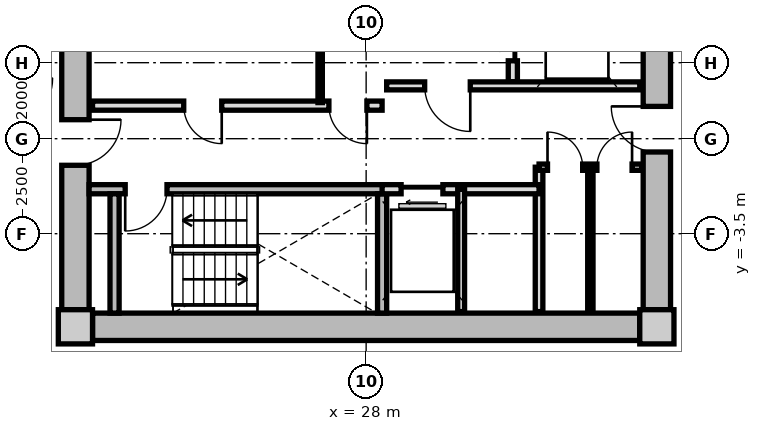
"""IFC4 building model, lengths in metres.
Left out: names, types, materials, properties, quantities, classifications, styles, units other than length and angle.
Written with IfcOpenShell. Run it as: python <this file> out.ifc"""

import sys

from ifc_helpers import new_model, si_unit, direction, frame, frame_2d, origin, origin_2d, place, context, subcontext, project, spatial, rectangle, extrude, source, transform, mapped, element, fill, save


model = new_model("IFC4")
c1 = context("Model", 3, precision=1e-05, world=origin(), true_north=direction((0.0, 1.0)))
c2 = subcontext(c1, "Body", "Model", "MODEL_VIEW")
j1 = project(units=[si_unit("LENGTHUNIT", "METRE"), si_unit("PLANEANGLEUNIT", "RADIAN")], contexts=[c1])
p1 = place(None, origin())
s1 = spatial("IfcSite", under=j1, at=p1, CompositionType="ELEMENT")
p2 = place(p1, origin())
s2 = spatial("IfcBuilding", under=s1, at=p2, CompositionType="ELEMENT")
p3 = place(p2, frame((0.0, 0.0, 87.1)))
s3 = spatial("IfcBuildingStorey", under=s2, at=p3, CompositionType="ELEMENT", Elevation=87.1)
m1 = source(origin(), c2, "Body", "SweptSolid", [
    extrude(rectangle(XDim=0.9, YDim=0.9, at=origin_2d()), origin(), (0.0, 0.0, 1.0), 3.05),
])
for number, where, z_axis, x_axis in (
    (1, (20.35, -5.95, 0.0), (0.0, 0.0, 1.0), (1.0, 0.0, 0.0)),
    (2, (35.65, -5.95, 0.0), (0.0, 0.0, 1.0), (1.0, 0.0, 0.0)),
):
    element("IfcColumn", number, at=place(p3, frame(where, z_axis=z_axis, x_axis=x_axis)), inside=s3, PredefinedType="COLUMN", context=c2, shape_type="MappedRepresentation", body=[
        mapped(m1, transform((0.0, 0.0, 0.0), x_axis=(1.0, 0.0, 0.0), y_axis=(0.0, 1.0, 0.0), z_axis=(0.0, 0.0, 1.0), scale=1.0)),
    ])
m2 = source(origin(), c2, "Body", "SweptSolid", [
    extrude(rectangle(XDim=14.4, YDim=0.72, at=frame_2d((7.2, 0.0))), origin(), (0.0, 0.0, 1.0), 2.79),
])
p4 = place(p3, frame((35.2, -5.95, 0.0), z_axis=(0.0, 0.0, 1.0), x_axis=(-1.0, 0.0, 0.0)))
e3 = element("IfcWall", 3, at=p4, inside=s3, PredefinedType="SHEAR", context=c2, shape_type="MappedRepresentation", body=[
    mapped(m2, transform((0.0, 0.0, 0.0), x_axis=(1.0, 0.0, 0.0), y_axis=(0.0, 1.0, 0.0), z_axis=(0.0, 0.0, 1.0), scale=1.0)),
])
m3 = source(origin(), c2, "Body", "SweptSolid", [
    extrude(rectangle(XDim=11.0, YDim=0.72, at=frame_2d((5.5, 0.0))), origin(), (0.0, 0.0, 1.0), 2.79),
])
p5 = place(p3, frame((20.35, -5.5, 0.0), z_axis=(0.0, 0.0, 1.0), x_axis=(0.0, 1.0, 0.0)))
e4 = element("IfcWall", 4, at=p5, inside=s3, PredefinedType="SHEAR", context=c2, shape_type="MappedRepresentation", body=[
    mapped(m3, transform((0.0, 0.0, 0.0), x_axis=(1.0, 0.0, 0.0), y_axis=(0.0, 1.0, 0.0), z_axis=(0.0, 0.0, 1.0), scale=1.0)),
])
p6 = place(p5, frame((3.8, 0.0, 0.0)))
e5 = element("IfcOpeningElement", 5, at=p6, cuts=e4, PredefinedType="OPENING", context=c2, shape_type="SweptSolid", body=[
    extrude(rectangle(XDim=1.2, YDim=2.15, at=frame_2d((0.6, 1.075))), frame((0.0, 0.37, 0.0), z_axis=(0.0, -1.0, 0.0), x_axis=(1.0, 0.0, 0.0)), (0.0, 0.0, 1.0), 0.74),
])
p7 = place(p3, frame((35.65, 5.5, 0.0), z_axis=(0.0, 0.0, 1.0), x_axis=(0.0, -1.0, 0.0)))
e6 = element("IfcWall", 6, at=p7, inside=s3, PredefinedType="SHEAR", context=c2, shape_type="MappedRepresentation", body=[
    mapped(m3, transform((0.0, 0.0, 0.0), x_axis=(1.0, 0.0, 0.0), y_axis=(0.0, 1.0, 0.0), z_axis=(0.0, 0.0, 1.0), scale=1.0)),
])
p8 = place(p7, frame((5.65, 0.0, 0.0)))
e7 = element("IfcOpeningElement", 7, at=p8, cuts=e6, PredefinedType="OPENING", context=c2, shape_type="SweptSolid", body=[
    extrude(rectangle(XDim=1.2, YDim=2.15, at=frame_2d((0.6, 1.075))), frame((0.0, 0.37, 0.0), z_axis=(0.0, -1.0, 0.0), x_axis=(1.0, 0.0, 0.0)), (0.0, 0.0, 1.0), 0.74),
])
m4 = source(origin(), c2, "Body", "SweptSolid", [
    extrude(rectangle(XDim=7.83, YDim=0.24, at=frame_2d((3.915, 0.0))), origin(), (0.0, 0.0, 1.0), 2.79),
])
p9 = place(p3, frame((20.71, -2.33, 0.0), z_axis=(0.0, 0.0, 1.0), x_axis=(1.0, 0.0, 0.0)))
e8 = element("IfcWall", 8, at=p9, inside=s3, PredefinedType="PARTITIONING", context=c2, shape_type="MappedRepresentation", body=[
    mapped(m4, transform((0.0, 0.0, 0.0), x_axis=(1.0, 0.0, 0.0), y_axis=(0.0, 1.0, 0.0), z_axis=(0.0, 0.0, 1.0), scale=1.0)),
])
p10 = place(p9, frame((0.95, 0.0, 0.0)))
e9 = element("IfcOpeningElement", 9, at=p10, cuts=e8, PredefinedType="OPENING", context=c2, shape_type="SweptSolid", body=[
    extrude(rectangle(XDim=1.1, YDim=2.15, at=frame_2d((0.55, 1.075))), frame((0.0, 0.13, 0.0), z_axis=(0.0, -1.0, 0.0), x_axis=(1.0, 0.0, 0.0)), (0.0, 0.0, 1.0), 0.26),
])
m5 = source(origin(), c2, "Body", "SweptSolid", [
    extrude(rectangle(XDim=3.14, YDim=0.24, at=frame_2d((1.57, 0.0))), origin(), (0.0, 0.0, 1.0), 2.79),
])
for number, where, z_axis, x_axis in (
    (10, (21.38, -5.59, 0.0), (0.0, 0.0, 1.0), (0.0, 1.0, 0.0)),
    (11, (28.42, -5.59, 0.0), (0.0, 0.0, 1.0), (0.0, 1.0, 0.0)),
):
    element("IfcWall", number, at=place(p3, frame(where, z_axis=z_axis, x_axis=x_axis)), inside=s3, PredefinedType="PARTITIONING", context=c2, shape_type="MappedRepresentation", body=[
        mapped(m5, transform((0.0, 0.0, 0.0), x_axis=(1.0, 0.0, 0.0), y_axis=(0.0, 1.0, 0.0), z_axis=(0.0, 0.0, 1.0), scale=1.0)),
    ])
m6 = source(origin(), c2, "Body", "SweptSolid", [
    extrude(rectangle(XDim=5.0, YDim=0.24, at=frame_2d((2.5, 0.0))), origin(), (0.0, 0.0, 1.0), 2.775),
])
p11 = place(p3, frame((31.86, 0.5, 0.0), z_axis=(0.0, 0.0, 1.0), x_axis=(0.0, 1.0, 0.0)))
e12 = element("IfcWall", 12, at=p11, inside=s3, PredefinedType="PARTITIONING", context=c2, shape_type="MappedRepresentation", body=[
    mapped(m6, transform((0.0, 0.0, 0.0), x_axis=(1.0, 0.0, 0.0), y_axis=(0.0, 1.0, 0.0), z_axis=(0.0, 0.0, 1.0), scale=1.0)),
])
p12 = place(p11, frame((3.05, 0.0, 0.0)))
e13 = element("IfcOpeningElement", 13, at=p12, cuts=e12, PredefinedType="OPENING", context=c2, shape_type="SweptSolid", body=[
    extrude(rectangle(XDim=1.3, YDim=2.2, at=frame_2d((0.65, 1.1))), frame((0.0, 0.13, 0.0), z_axis=(0.0, -1.0, 0.0), x_axis=(1.0, 0.0, 0.0)), (0.0, 0.0, 1.0), 0.26),
])
p13 = place(p11, frame((0.55, 0.0, 0.0)))
e14 = element("IfcOpeningElement", 14, at=p13, cuts=e12, PredefinedType="OPENING", context=c2, shape_type="SweptSolid", body=[
    extrude(rectangle(XDim=1.3, YDim=2.2, at=frame_2d((0.65, 1.1))), frame((0.0, 0.13, 0.0), z_axis=(0.0, -1.0, 0.0), x_axis=(1.0, 0.0, 0.0)), (0.0, 0.0, 1.0), 0.26),
])
m7 = source(origin(), c2, "Body", "SweptSolid", [
    extrude(rectangle(XDim=6.66, YDim=0.21, at=frame_2d((3.33, 0.0))), origin(), (0.0, 0.0, 1.0), 2.775),
])
p14 = place(p3, frame((28.54, 0.39, 0.0), z_axis=(0.0, 0.0, 1.0), x_axis=(1.0, 0.0, 0.0)))
e15 = element("IfcWall", 15, at=p14, inside=s3, PredefinedType="PARTITIONING", context=c2, shape_type="MappedRepresentation", body=[
    mapped(m7, transform((0.0, 0.0, 0.0), x_axis=(1.0, 0.0, 0.0), y_axis=(0.0, 1.0, 0.0), z_axis=(0.0, 0.0, 1.0), scale=1.0)),
])
p15 = place(p14, frame((1.0, 0.0, 0.0)))
e16 = element("IfcOpeningElement", 16, at=p15, cuts=e15, PredefinedType="OPENING", context=c2, shape_type="SweptSolid", body=[
    extrude(rectangle(XDim=1.2, YDim=2.15, at=frame_2d((0.6, 1.075))), frame((0.0, 0.115, 0.0), z_axis=(0.0, -1.0, 0.0), x_axis=(1.0, 0.0, 0.0)), (0.0, 0.0, 1.0), 0.23),
])
m8 = source(origin(), c2, "Body", "SweptSolid", [
    extrude(rectangle(XDim=7.62, YDim=0.24, at=frame_2d((3.81, 0.0))), origin(), (0.0, 0.0, 1.0), 2.775),
])
p16 = place(p3, frame((20.8, -0.13, 0.0), z_axis=(0.0, 0.0, 1.0), x_axis=(1.0, 0.0, 0.0)))
e17 = element("IfcWall", 17, at=p16, inside=s3, PredefinedType="PARTITIONING", context=c2, shape_type="MappedRepresentation", body=[
    mapped(m8, transform((0.0, 0.0, 0.0), x_axis=(1.0, 0.0, 0.0), y_axis=(0.0, 1.0, 0.0), z_axis=(0.0, 0.0, 1.0), scale=1.0)),
])
p17 = place(p16, frame((6.22, 0.0, 0.0)))
e18 = element("IfcOpeningElement", 18, at=p17, cuts=e17, PredefinedType="OPENING", context=c2, shape_type="SweptSolid", body=[
    extrude(rectangle(XDim=1.0, YDim=2.1, at=frame_2d((0.5, 1.05))), frame((0.0, 0.13, 0.0), z_axis=(0.0, -1.0, 0.0), x_axis=(1.0, 0.0, 0.0)), (0.0, 0.0, 1.0), 0.26),
])
p18 = place(p16, frame((2.4, 0.0, 0.0)))
e19 = element("IfcOpeningElement", 19, at=p18, cuts=e17, PredefinedType="OPENING", context=c2, shape_type="SweptSolid", body=[
    extrude(rectangle(XDim=1.0, YDim=2.1, at=frame_2d((0.5, 1.05))), frame((0.0, 0.13, 0.0), z_axis=(0.0, -1.0, 0.0), x_axis=(1.0, 0.0, 0.0)), (0.0, 0.0, 1.0), 0.26),
])
m9 = source(origin(), c2, "Body", "SweptSolid", [
    extrude(rectangle(XDim=2.33, YDim=0.115, at=frame_2d((1.165, 0.0))), origin(), (0.0, 0.0, 1.0), 2.775),
])
p19 = place(p3, frame((26.79, -0.05, 0.0), z_axis=(0.0, 0.0, 1.0), x_axis=(0.0, 1.0, 0.0)))
e20 = element("IfcWall", 20, at=p19, inside=s3, PredefinedType="PARTITIONING", context=c2, shape_type="MappedRepresentation", body=[
    mapped(m9, transform((0.0, 0.0, 0.0), x_axis=(1.0, 0.0, 0.0), y_axis=(0.0, 1.0, 0.0), z_axis=(0.0, 0.0, 1.0), scale=1.0)),
])
m10 = source(origin(), c2, "Body", "SweptSolid", [
    extrude(rectangle(XDim=3.8, YDim=0.2, at=frame_2d((1.9, 0.0))), origin(), (0.0, 0.0, 1.0), 2.775),
])
p20 = place(p3, frame((32.55, -5.55, 0.0), z_axis=(0.0, 0.0, 1.0), x_axis=(0.0, 1.0, 0.0)))
e21 = element("IfcWall", 21, at=p20, inside=s3, PredefinedType="PARTITIONING", context=c2, shape_type="MappedRepresentation", body=[
    mapped(m10, transform((0.0, 0.0, 0.0), x_axis=(1.0, 0.0, 0.0), y_axis=(0.0, 1.0, 0.0), z_axis=(0.0, 0.0, 1.0), scale=1.0)),
])
m11 = source(origin(), c2, "Body", "SweptSolid", [
    extrude(rectangle(XDim=4.13, YDim=0.24, at=frame_2d((2.065, 0.0))), origin(), (0.0, 0.0, 1.0), 2.775),
])
p21 = place(p3, frame((28.42, -2.33, 0.0), z_axis=(0.0, 0.0, 1.0), x_axis=(1.0, 0.0, 0.0)))
e22 = element("IfcWall", 22, at=p21, inside=s3, PredefinedType="PARTITIONING", context=c2, shape_type="MappedRepresentation", body=[
    mapped(m11, transform((0.0, 0.0, 0.0), x_axis=(1.0, 0.0, 0.0), y_axis=(0.0, 1.0, 0.0), z_axis=(0.0, 0.0, 1.0), scale=1.0)),
])
p22 = place(p21, frame((0.5, 0.0, 0.0)))
e23 = element("IfcOpeningElement", 23, at=p22, cuts=e22, PredefinedType="OPENING", context=c2, shape_type="SweptSolid", body=[
    extrude(rectangle(XDim=1.1, YDim=2.2, at=frame_2d((0.55, 1.1))), frame((0.0, 0.13, 0.0), z_axis=(0.0, -1.0, 0.0), x_axis=(1.0, 0.0, 0.0)), (0.0, 0.0, 1.0), 0.26),
])
m12 = source(origin(), c2, "Body", "SweptSolid", [
    extrude(rectangle(XDim=3.22, YDim=0.18, at=frame_2d((1.61, 0.0))), origin(), (0.0, 0.0, 1.0), 2.775),
])
p23 = place(p3, frame((30.5, -5.55, 0.0), z_axis=(0.0, 0.0, 1.0), x_axis=(0.0, 1.0, 0.0)))
e24 = element("IfcWall", 24, at=p23, inside=s3, PredefinedType="PARTITIONING", context=c2, shape_type="MappedRepresentation", body=[
    mapped(m12, transform((0.0, 0.0, 0.0), x_axis=(1.0, 0.0, 0.0), y_axis=(0.0, 1.0, 0.0), z_axis=(0.0, 0.0, 1.0), scale=1.0)),
])
m13 = source(origin(), c2, "Body", "SweptSolid", [
    extrude(rectangle(XDim=2.7, YDim=0.165, at=frame_2d((1.35, 0.0))), origin(), (0.0, 0.0, 1.0), 2.775),
])
p24 = place(p3, frame((32.55, -1.75, 0.0), z_axis=(0.0, 0.0, 1.0), x_axis=(1.0, 0.0, 0.0)))
e25 = element("IfcWall", 25, at=p24, inside=s3, PredefinedType="PARTITIONING", context=c2, shape_type="MappedRepresentation", body=[
    mapped(m13, transform((0.0, 0.0, 0.0), x_axis=(1.0, 0.0, 0.0), y_axis=(0.0, 1.0, 0.0), z_axis=(0.0, 0.0, 1.0), scale=1.0)),
])
p25 = place(p24, frame((0.222, 0.0, 0.0)))
e26 = element("IfcOpeningElement", 26, at=p25, cuts=e25, PredefinedType="OPENING", context=c2, shape_type="SweptSolid", body=[
    extrude(rectangle(XDim=0.925, YDim=2.1, at=frame_2d((0.462, 1.05))), frame((0.0, 0.093, 0.0), z_axis=(0.0, -1.0, 0.0), x_axis=(1.0, 0.0, 0.0)), (0.0, 0.0, 1.0), 0.185),
])
p26 = place(p24, frame((1.522, 0.0, 0.0)))
e27 = element("IfcOpeningElement", 27, at=p26, cuts=e25, PredefinedType="OPENING", context=c2, shape_type="SweptSolid", body=[
    extrude(rectangle(XDim=0.925, YDim=2.1, at=frame_2d((0.462, 1.05))), frame((0.0, 0.093, 0.0), z_axis=(0.0, -1.0, 0.0), x_axis=(1.0, 0.0, 0.0)), (0.0, 0.0, 1.0), 0.185),
])
m14 = source(origin(), c2, "Body", "SweptSolid", [
    extrude(rectangle(XDim=3.8, YDim=0.14, at=frame_2d((1.9, 0.0))), origin(), (0.0, 0.0, 1.0), 2.775),
])
p27 = place(p3, frame((33.9, -5.55, 0.0), z_axis=(0.0, 0.0, 1.0), x_axis=(0.0, 1.0, 0.0)))
e28 = element("IfcWall", 28, at=p27, inside=s3, PredefinedType="PARTITIONING", context=c2, shape_type="MappedRepresentation", body=[
    mapped(m14, transform((0.0, 0.0, 0.0), x_axis=(1.0, 0.0, 0.0), y_axis=(0.0, 1.0, 0.0), z_axis=(0.0, 0.0, 1.0), scale=1.0)),
])
m15 = source(origin(), c2, "Body", "SweptSolid", [
    extrude(rectangle(XDim=1.1, YDim=2.15, at=frame_2d((0.55, 1.075))), frame((0.0, 0.025, 0.0), z_axis=(0.0, -1.0, 0.0), x_axis=(1.0, 0.0, 0.0)), (0.0, 0.0, 1.0), 0.05),
])
p28 = place(p10, frame((1.1, 0.0, 0.0), z_axis=(0.0, 0.0, 1.0), x_axis=(-1.0, 0.0, 0.0)))
e29 = element("IfcDoor", 29, at=p28, inside=s3, OperationType="SINGLE_SWING_RIGHT", PredefinedType="DOOR", context=c2, shape_type="MappedRepresentation", body=[
    mapped(m15, transform((0.0, 0.0, 0.0), x_axis=(1.0, 0.0, 0.0), y_axis=(0.0, 1.0, 0.0), z_axis=(0.0, 0.0, 1.0), scale=1.0)),
])
fill(e9, e29)
m16 = source(origin(), c2, "Body", "SweptSolid", [
    extrude(rectangle(XDim=1.3, YDim=2.2, at=frame_2d((0.65, 1.1))), frame((0.0, 0.025, 0.0), z_axis=(0.0, -1.0, 0.0), x_axis=(1.0, 0.0, 0.0)), (0.0, 0.0, 1.0), 0.05),
])
p29 = place(p13, origin())
e30 = element("IfcDoor", 30, at=p29, inside=s3, OperationType="SLIDING_TO_RIGHT", PredefinedType="DOOR", context=c2, shape_type="MappedRepresentation", body=[
    mapped(m16, transform((0.0, 0.0, 0.0), x_axis=(1.0, 0.0, 0.0), y_axis=(0.0, 1.0, 0.0), z_axis=(0.0, 0.0, 1.0), scale=1.0)),
])
fill(e14, e30)
m17 = source(origin(), c2, "Body", "SweptSolid", [
    extrude(rectangle(XDim=1.2, YDim=2.15, at=frame_2d((0.6, 1.075))), frame((0.0, 0.025, 0.0), z_axis=(0.0, -1.0, 0.0), x_axis=(1.0, 0.0, 0.0)), (0.0, 0.0, 1.0), 0.05),
])
p30 = place(p15, frame((1.2, 0.0, 0.0), z_axis=(0.0, 0.0, 1.0), x_axis=(-1.0, 0.0, 0.0)))
e31 = element("IfcDoor", 31, at=p30, inside=s3, OperationType="SINGLE_SWING_LEFT", PredefinedType="DOOR", context=c2, shape_type="MappedRepresentation", body=[
    mapped(m17, transform((0.0, 0.0, 0.0), x_axis=(1.0, 0.0, 0.0), y_axis=(0.0, 1.0, 0.0), z_axis=(0.0, 0.0, 1.0), scale=1.0)),
])
fill(e16, e31)
p31 = place(p6, frame((1.2, 0.0, 0.0), z_axis=(0.0, 0.0, 1.0), x_axis=(-1.0, 0.0, 0.0)))
e32 = element("IfcDoor", 32, at=p31, inside=s3, OperationType="SINGLE_SWING_LEFT", PredefinedType="DOOR", context=c2, shape_type="MappedRepresentation", body=[
    mapped(m17, transform((0.0, 0.0, 0.0), x_axis=(1.0, 0.0, 0.0), y_axis=(0.0, 1.0, 0.0), z_axis=(0.0, 0.0, 1.0), scale=1.0)),
])
fill(e5, e32)
p32 = place(p8, frame((1.2, 0.0, 0.0), z_axis=(0.0, 0.0, 1.0), x_axis=(-1.0, 0.0, 0.0)))
e33 = element("IfcDoor", 33, at=p32, inside=s3, OperationType="SINGLE_SWING_RIGHT", PredefinedType="DOOR", context=c2, shape_type="MappedRepresentation", body=[
    mapped(m17, transform((0.0, 0.0, 0.0), x_axis=(1.0, 0.0, 0.0), y_axis=(0.0, 1.0, 0.0), z_axis=(0.0, 0.0, 1.0), scale=1.0)),
])
fill(e7, e33)
m18 = source(origin(), c2, "Body", "SweptSolid", [
    extrude(rectangle(XDim=1.0, YDim=2.1, at=frame_2d((0.5, 1.05))), frame((0.0, 0.025, 0.0), z_axis=(0.0, -1.0, 0.0), x_axis=(1.0, 0.0, 0.0)), (0.0, 0.0, 1.0), 0.05),
])
p33 = place(p17, frame((1.0, 0.0, 0.0), z_axis=(0.0, 0.0, 1.0), x_axis=(-1.0, 0.0, 0.0)))
e34 = element("IfcDoor", 34, at=p33, inside=s3, OperationType="SINGLE_SWING_LEFT", PredefinedType="DOOR", context=c2, shape_type="MappedRepresentation", body=[
    mapped(m18, transform((0.0, 0.0, 0.0), x_axis=(1.0, 0.0, 0.0), y_axis=(0.0, 1.0, 0.0), z_axis=(0.0, 0.0, 1.0), scale=1.0)),
])
fill(e18, e34)
p34 = place(p18, frame((1.0, 0.0, 0.0), z_axis=(0.0, 0.0, 1.0), x_axis=(-1.0, 0.0, 0.0)))
e35 = element("IfcDoor", 35, at=p34, inside=s3, OperationType="SINGLE_SWING_LEFT", PredefinedType="DOOR", context=c2, shape_type="MappedRepresentation", body=[
    mapped(m18, transform((0.0, 0.0, 0.0), x_axis=(1.0, 0.0, 0.0), y_axis=(0.0, 1.0, 0.0), z_axis=(0.0, 0.0, 1.0), scale=1.0)),
])
fill(e19, e35)
m19 = source(origin(), c2, "Body", "SweptSolid", [
    extrude(rectangle(XDim=1.1, YDim=2.2, at=frame_2d((0.55, 1.1))), frame((0.0, 0.025, 0.0), z_axis=(0.0, -1.0, 0.0), x_axis=(1.0, 0.0, 0.0)), (0.0, 0.0, 1.0), 0.05),
])
p35 = place(p22, frame((1.1, 0.0, 0.0), z_axis=(0.0, 0.0, 1.0), x_axis=(-1.0, 0.0, 0.0)))
e36 = element("IfcDoor", 36, at=p35, inside=s3, OperationType="SLIDING_TO_LEFT", PredefinedType="DOOR", context=c2, shape_type="MappedRepresentation", body=[
    mapped(m19, transform((0.0, 0.0, 0.0), x_axis=(1.0, 0.0, 0.0), y_axis=(0.0, 1.0, 0.0), z_axis=(0.0, 0.0, 1.0), scale=1.0)),
])
fill(e23, e36)
m20 = source(origin(), c2, "Body", "SweptSolid", [
    extrude(rectangle(XDim=0.925, YDim=2.1, at=frame_2d((0.462, 1.05))), frame((0.0, 0.025, 0.0), z_axis=(0.0, -1.0, 0.0), x_axis=(1.0, 0.0, 0.0)), (0.0, 0.0, 1.0), 0.05),
])
p36 = place(p25, origin())
e37 = element("IfcDoor", 37, at=p36, inside=s3, OperationType="SINGLE_SWING_LEFT", PredefinedType="DOOR", context=c2, shape_type="MappedRepresentation", body=[
    mapped(m20, transform((0.0, 0.0, 0.0), x_axis=(1.0, 0.0, 0.0), y_axis=(0.0, 1.0, 0.0), z_axis=(0.0, 0.0, 1.0), scale=1.0)),
])
fill(e26, e37)
p37 = place(p26, origin())
e38 = element("IfcDoor", 38, at=p37, inside=s3, OperationType="SINGLE_SWING_RIGHT", PredefinedType="DOOR", context=c2, shape_type="MappedRepresentation", body=[
    mapped(m20, transform((0.0, 0.0, 0.0), x_axis=(1.0, 0.0, 0.0), y_axis=(0.0, 1.0, 0.0), z_axis=(0.0, 0.0, 1.0), scale=1.0)),
])
fill(e27, e38)
save(model, sys.argv[1])
